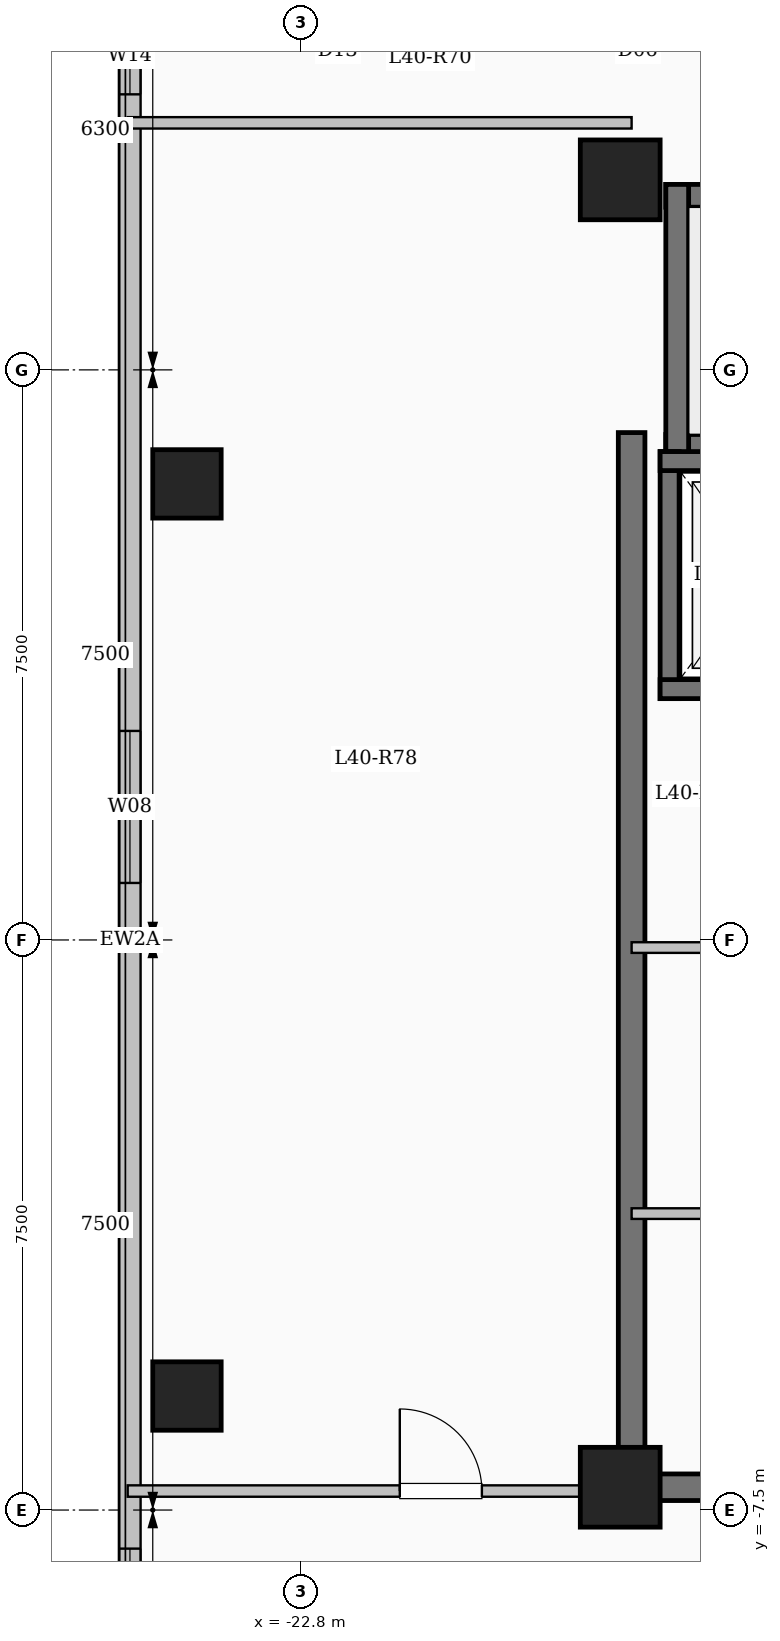
"""IFC4 building model, lengths in metres.
Left out: names, types, materials, properties, quantities, classifications, styles, units other than length and angle.
Written with IfcOpenShell. Run it as: python <this file> out.ifc"""

import sys

from ifc_helpers import new_model, si_unit, direction, frame, frame_2d, origin, origin_2d, place, context, subcontext, project, spatial, rectangle, extrude, element, fill, save


model = new_model("IFC4")
c1 = context("Model", 3, precision=1e-05, world=origin(), true_north=direction((0.0, 1.0)))
c2 = subcontext(c1, "Body", "Model", "MODEL_VIEW")
j1 = project(units=[si_unit("LENGTHUNIT", "METRE"), si_unit("PLANEANGLEUNIT", "RADIAN")], contexts=[c1])
p1 = place(None, origin())
s1 = spatial("IfcSite", under=j1, at=p1, CompositionType="ELEMENT")
p2 = place(p1, origin())
s2 = spatial("IfcBuilding", under=s1, at=p2, CompositionType="ELEMENT")
p3 = place(p2, frame((0.0, 0.0, 149.35)))
s3 = spatial("IfcBuildingStorey", under=s2, at=p3, CompositionType="ELEMENT", Elevation=149.35)
for number, where, z_axis, x_axis in (
    (1, (-18.6, -7.2, 0.0), (0.0, 0.0, 1.0), (1.0, 0.0, 0.0)),
    (2, (-18.6, 10.0, 0.0), (0.0, 0.0, 1.0), (1.0, 0.0, 0.0)),
):
    element("IfcColumn", number, at=place(p3, frame(where, z_axis=z_axis, x_axis=x_axis)), inside=s3, PredefinedType="COLUMN", context=c2, shape_type="SweptSolid", body=[
        extrude(rectangle(XDim=1.05, YDim=1.05, at=origin_2d()), origin(), (0.0, 0.0, 1.0), 3.35),
    ])
for number, where, z_axis, x_axis in (
    (3, (-24.3, -6.0, 0.0), (0.0, 0.0, 1.0), (1.0, 0.0, 0.0)),
    (4, (-24.3, 6.0, 0.0), (0.0, 0.0, 1.0), (1.0, 0.0, 0.0)),
):
    element("IfcColumn", number, at=place(p3, frame(where, z_axis=z_axis, x_axis=x_axis)), inside=s3, PredefinedType="COLUMN", context=c2, shape_type="SweptSolid", body=[
        extrude(rectangle(XDim=0.9, YDim=0.9, at=origin_2d()), origin(), (0.0, 0.0, 1.0), 3.35),
    ])
p4 = place(p3, frame((-25.05, -17.25, 0.0), z_axis=(0.0, 0.0, 1.0), x_axis=(0.0, 1.0, 0.0)))
e5 = element("IfcWall", 5, at=p4, inside=s3, PredefinedType="SOLIDWALL", context=c2, shape_type="SweptSolid", body=[
    extrude(rectangle(XDim=34.5, YDim=0.28, at=frame_2d((17.25, 0.0))), origin(), (0.0, 0.0, 1.0), 3.1),
])
p5 = place(p4, frame((2.35, 0.0, 0.9)))
e6 = element("IfcOpeningElement", 6, at=p5, cuts=e5, PredefinedType="OPENING", context=c2, shape_type="SweptSolid", body=[
    extrude(rectangle(XDim=2.2, YDim=1.75, at=frame_2d((1.1, 0.875))), frame((0.0, 0.15, 0.0), z_axis=(0.0, -1.0, 0.0), x_axis=(1.0, 0.0, 0.0)), (0.0, 0.0, 1.0), 0.3),
])
p6 = place(p4, frame((7.742, 0.0, 0.9)))
e7 = element("IfcOpeningElement", 7, at=p6, cuts=e5, PredefinedType="OPENING", context=c2, shape_type="SweptSolid", body=[
    extrude(rectangle(XDim=1.5, YDim=1.65, at=frame_2d((0.75, 0.825))), frame((0.0, 0.15, 0.0), z_axis=(0.0, -1.0, 0.0), x_axis=(1.0, 0.0, 0.0)), (0.0, 0.0, 1.0), 0.3),
])
p7 = place(p4, frame((18.0, 0.0, 0.9)))
e8 = element("IfcOpeningElement", 8, at=p7, cuts=e5, PredefinedType="OPENING", context=c2, shape_type="SweptSolid", body=[
    extrude(rectangle(XDim=2.0, YDim=1.7, at=frame_2d((1.0, 0.85))), frame((0.0, 0.15, 0.0), z_axis=(0.0, -1.0, 0.0), x_axis=(1.0, 0.0, 0.0)), (0.0, 0.0, 1.0), 0.3),
])
p8 = place(p4, frame((28.375, 0.0, 0.95)))
e9 = element("IfcOpeningElement", 9, at=p8, cuts=e5, PredefinedType="OPENING", context=c2, shape_type="SweptSolid", body=[
    extrude(rectangle(XDim=1.0, YDim=1.5, at=frame_2d((0.5, 0.75))), frame((0.0, 0.15, 0.0), z_axis=(0.0, -1.0, 0.0), x_axis=(1.0, 0.0, 0.0)), (0.0, 0.0, 1.0), 0.3),
])
p9 = place(p4, frame((31.125, 0.0, 0.9)))
e10 = element("IfcOpeningElement", 10, at=p9, cuts=e5, PredefinedType="OPENING", context=c2, shape_type="SweptSolid", body=[
    extrude(rectangle(XDim=2.0, YDim=1.7, at=frame_2d((1.0, 0.85))), frame((0.0, 0.15, 0.0), z_axis=(0.0, -1.0, 0.0), x_axis=(1.0, 0.0, 0.0)), (0.0, 0.0, 1.0), 0.3),
])
p10 = place(p3, frame((-18.0, 9.79, 0.0), z_axis=(0.0, 0.0, 1.0), x_axis=(1.0, 0.0, 0.0)))
e11 = element("IfcWall", 11, at=p10, inside=s3, PredefinedType="SHEAR", context=c2, shape_type="SweptSolid", body=[
    extrude(rectangle(XDim=8.0, YDim=0.3, at=frame_2d((4.0, 0.0))), origin(), (0.0, 0.0, 1.0), 3.35),
])
p11 = place(p3, frame((-18.0, 6.5, 0.0), z_axis=(0.0, 0.0, 1.0), x_axis=(1.0, 0.0, 0.0)))
e12 = element("IfcWall", 12, at=p11, inside=s3, PredefinedType="SHEAR", context=c2, shape_type="SweptSolid", body=[
    extrude(rectangle(XDim=8.0, YDim=0.3, at=frame_2d((4.0, 0.0))), origin(), (0.0, 0.0, 1.0), 3.35),
])
p12 = place(p11, frame((6.45, 0.0, 0.0)))
e13 = element("IfcOpeningElement", 13, at=p12, cuts=e12, PredefinedType="OPENING", context=c2, shape_type="SweptSolid", body=[
    extrude(rectangle(XDim=1.0, YDim=2.15, at=frame_2d((0.5, 1.075))), frame((0.0, 0.16, 0.0), z_axis=(0.0, -1.0, 0.0), x_axis=(1.0, 0.0, 0.0)), (0.0, 0.0, 1.0), 0.32),
])
p13 = place(p3, frame((-17.85, 6.35, 0.0), z_axis=(0.0, 0.0, 1.0), x_axis=(0.0, 1.0, 0.0)))
e14 = element("IfcWall", 14, at=p13, inside=s3, PredefinedType="SHEAR", context=c2, shape_type="SweptSolid", body=[
    extrude(rectangle(XDim=3.59, YDim=0.3, at=frame_2d((1.795, 0.0))), origin(), (0.0, 0.0, 1.0), 3.35),
])
p14 = place(p3, frame((-17.95, 3.175, 0.0), z_axis=(0.0, 0.0, 1.0), x_axis=(0.0, 1.0, 0.0)))
e15 = element("IfcWall", 15, at=p14, inside=s3, PredefinedType="SHEAR", context=c2, shape_type="SweptSolid", body=[
    extrude(rectangle(XDim=3.25, YDim=0.25, at=frame_2d((1.625, 0.0))), origin(), (0.0, 0.0, 1.0), 3.35),
])
for number, where, z_axis, x_axis in (
    (16, (-18.075, 3.3, 0.0), (0.0, 0.0, 1.0), (1.0, 0.0, 0.0)),
    (17, (-18.075, 6.3, 0.0), (0.0, 0.0, 1.0), (1.0, 0.0, 0.0)),
):
    element("IfcWall", number, at=place(p3, frame(where, z_axis=z_axis, x_axis=x_axis)), inside=s3, PredefinedType="SHEAR", context=c2, shape_type="SweptSolid", body=[
        extrude(rectangle(XDim=2.55, YDim=0.25, at=frame_2d((1.275, 0.0))), origin(), (0.0, 0.0, 1.0), 3.35),
    ])
p15 = place(p3, frame((-18.45, -7.375, 0.0), z_axis=(0.0, 0.0, 1.0), x_axis=(0.0, 1.0, 0.0)))
e18 = element("IfcWall", 18, at=p15, inside=s3, PredefinedType="SHEAR", context=c2, shape_type="SweptSolid", body=[
    extrude(rectangle(XDim=14.05, YDim=0.35, at=frame_2d((7.025, 0.0))), origin(), (0.0, 0.0, 1.0), 3.35),
])
p16 = place(p3, frame((-18.625, -7.2, 0.0), z_axis=(0.0, 0.0, 1.0), x_axis=(1.0, 0.0, 0.0)))
e19 = element("IfcWall", 19, at=p16, inside=s3, PredefinedType="SHEAR", context=c2, shape_type="SweptSolid", body=[
    extrude(rectangle(XDim=8.55, YDim=0.35, at=frame_2d((4.275, 0.0))), origin(), (0.0, 0.0, 1.0), 3.35),
])
p17 = place(p3, frame((-18.45, -3.6, 0.0), z_axis=(0.0, 0.0, 1.0), x_axis=(1.0, 0.0, 0.0)))
e20 = element("IfcWall", 20, at=p17, inside=s3, PredefinedType="PARTITIONING", context=c2, shape_type="SweptSolid", body=[
    extrude(rectangle(XDim=3.05, YDim=0.14, at=frame_2d((1.525, 0.0))), origin(), (0.0, 0.0, 1.0), 3.1),
])
p18 = place(p17, frame((1.05, 0.0, 0.0)))
e21 = element("IfcOpeningElement", 21, at=p18, cuts=e20, PredefinedType="OPENING", context=c2, shape_type="SweptSolid", body=[
    extrude(rectangle(XDim=0.9, YDim=2.08, at=frame_2d((0.45, 1.04))), frame((0.0, 0.08, 0.0), z_axis=(0.0, -1.0, 0.0), x_axis=(1.0, 0.0, 0.0)), (0.0, 0.0, 1.0), 0.16),
])
p19 = place(p3, frame((-18.45, -0.1, 0.0), z_axis=(0.0, 0.0, 1.0), x_axis=(1.0, 0.0, 0.0)))
e22 = element("IfcWall", 22, at=p19, inside=s3, PredefinedType="PARTITIONING", context=c2, shape_type="SweptSolid", body=[
    extrude(rectangle(XDim=3.05, YDim=0.14, at=frame_2d((1.525, 0.0))), origin(), (0.0, 0.0, 1.0), 3.1),
])
p20 = place(p19, frame((1.05, 0.0, 0.0)))
e23 = element("IfcOpeningElement", 23, at=p20, cuts=e22, PredefinedType="OPENING", context=c2, shape_type="SweptSolid", body=[
    extrude(rectangle(XDim=0.9, YDim=2.08, at=frame_2d((0.45, 1.04))), frame((0.0, 0.08, 0.0), z_axis=(0.0, -1.0, 0.0), x_axis=(1.0, 0.0, 0.0)), (0.0, 0.0, 1.0), 0.16),
])
p21 = place(p3, frame((-25.08, -7.25, 0.0), z_axis=(0.0, 0.0, 1.0), x_axis=(1.0, 0.0, 0.0)))
e24 = element("IfcWall", 24, at=p21, inside=s3, PredefinedType="PARTITIONING", context=c2, shape_type="SweptSolid", body=[
    extrude(rectangle(XDim=6.63, YDim=0.15, at=frame_2d((3.315, 0.0))), origin(), (0.0, 0.0, 1.0), 3.1),
])
p22 = place(p21, frame((3.58, 0.0, 0.0)))
e25 = element("IfcOpeningElement", 25, at=p22, cuts=e24, PredefinedType="OPENING", context=c2, shape_type="SweptSolid", body=[
    extrude(rectangle(XDim=1.08, YDim=2.15, at=frame_2d((0.54, 1.075))), frame((0.0, 0.085, 0.0), z_axis=(0.0, -1.0, 0.0), x_axis=(1.0, 0.0, 0.0)), (0.0, 0.0, 1.0), 0.17),
])
p23 = place(p3, frame((-25.08, 10.75, 0.0), z_axis=(0.0, 0.0, 1.0), x_axis=(1.0, 0.0, 0.0)))
e26 = element("IfcWall", 26, at=p23, inside=s3, PredefinedType="PARTITIONING", context=c2, shape_type="SweptSolid", body=[
    extrude(rectangle(XDim=6.63, YDim=0.15, at=frame_2d((3.315, 0.0))), origin(), (0.0, 0.0, 1.0), 3.1),
])
p24 = place(p6, origin())
e27 = element("IfcWindow", 27, at=p24, inside=s3, PartitioningType="SINGLE_PANEL", PredefinedType="WINDOW", context=c2, shape_type="SweptSolid", body=[
    extrude(rectangle(XDim=1.5, YDim=1.65, at=frame_2d((0.75, 0.825))), frame((0.0, 0.03, 0.0), z_axis=(0.0, -1.0, 0.0), x_axis=(1.0, 0.0, 0.0)), (0.0, 0.0, 1.0), 0.06),
])
fill(e7, e27)
p25 = place(p7, origin())
e28 = element("IfcWindow", 28, at=p25, inside=s3, PartitioningType="SINGLE_PANEL", PredefinedType="WINDOW", context=c2, shape_type="SweptSolid", body=[
    extrude(rectangle(XDim=2.0, YDim=1.7, at=frame_2d((1.0, 0.85))), frame((0.0, 0.03, 0.0), z_axis=(0.0, -1.0, 0.0), x_axis=(1.0, 0.0, 0.0)), (0.0, 0.0, 1.0), 0.06),
])
fill(e8, e28)
p26 = place(p8, origin())
e29 = element("IfcWindow", 29, at=p26, inside=s3, PartitioningType="SINGLE_PANEL", PredefinedType="WINDOW", context=c2, shape_type="SweptSolid", body=[
    extrude(rectangle(XDim=1.0, YDim=1.5, at=frame_2d((0.5, 0.75))), frame((0.0, 0.03, 0.0), z_axis=(0.0, -1.0, 0.0), x_axis=(1.0, 0.0, 0.0)), (0.0, 0.0, 1.0), 0.06),
])
fill(e9, e29)
p27 = place(p22, origin())
e30 = element("IfcDoor", 30, at=p27, inside=s3, OperationType="SINGLE_SWING_LEFT", PredefinedType="DOOR", context=c2, shape_type="SweptSolid", body=[
    extrude(rectangle(XDim=1.08, YDim=2.15, at=frame_2d((0.54, 1.075))), frame((0.0, 0.025, 0.0), z_axis=(0.0, -1.0, 0.0), x_axis=(1.0, 0.0, 0.0)), (0.0, 0.0, 1.0), 0.05),
])
fill(e25, e30)
save(model, sys.argv[1])
